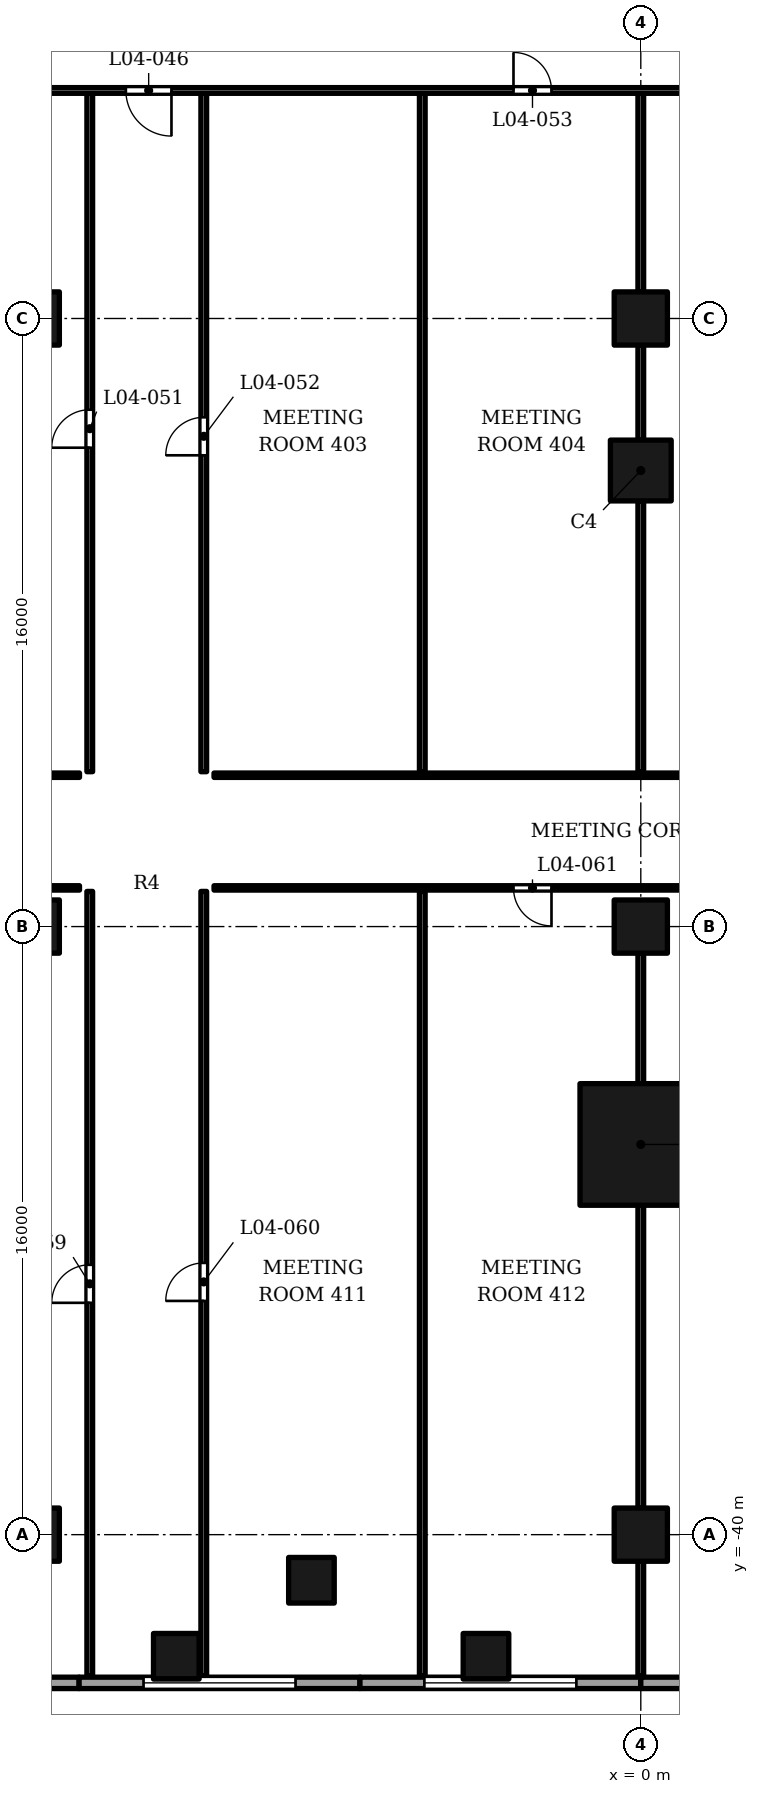
"""IFC4 building model, lengths in metres.
Left out: names, types, materials, properties, quantities, classifications, styles, units other than length and angle.
Written with IfcOpenShell. Run it as: python <this file> out.ifc"""

import sys

from ifc_helpers import new_model, si_unit, direction, frame, frame_2d, origin, origin_2d, place, context, subcontext, project, spatial, rectangle, extrude, element, fill, save


model = new_model("IFC4")
c1 = context("Model", 3, precision=1e-05, world=origin(), true_north=direction((0.0, 1.0)))
c2 = subcontext(c1, "Body", "Model", "MODEL_VIEW")
j1 = project(units=[si_unit("LENGTHUNIT", "METRE"), si_unit("PLANEANGLEUNIT", "RADIAN")], contexts=[c1])
p1 = place(None, origin())
s1 = spatial("IfcSite", under=j1, at=p1, CompositionType="ELEMENT")
p2 = place(p1, origin())
s2 = spatial("IfcBuilding", under=s1, at=p2, CompositionType="ELEMENT")
p3 = place(p2, frame((0.0, 0.0, 34.5)))
s3 = spatial("IfcBuildingStorey", under=s2, at=p3, CompositionType="ELEMENT", Elevation=34.5)
for number, where, z_axis, x_axis in (
    (1, (-16.0, -40.0, 0.0), (0.0, 0.0, 1.0), (1.0, 0.0, 0.0)),
    (2, (-16.0, -24.0, 0.0), (0.0, 0.0, 1.0), (1.0, 0.0, 0.0)),
    (3, (-16.0, -8.0, 0.0), (0.0, 0.0, 1.0), (1.0, 0.0, 0.0)),
    (4, (0.0, -40.0, 0.0), (0.0, 0.0, 1.0), (1.0, 0.0, 0.0)),
    (5, (0.0, -24.0, 0.0), (0.0, 0.0, 1.0), (1.0, 0.0, 0.0)),
    (6, (0.0, -8.0, 0.0), (0.0, 0.0, 1.0), (1.0, 0.0, 0.0)),
):
    element("IfcColumn", number, at=place(p3, frame(where, z_axis=z_axis, x_axis=x_axis)), inside=s3, PredefinedType="COLUMN", context=c2, shape_type="SweptSolid", body=[
        extrude(rectangle(XDim=1.4, YDim=1.4, at=origin_2d()), origin(), (0.0, 0.0, 1.0), 5.5),
    ])
for number, where, z_axis, x_axis in (
    (7, (-8.667, -41.2, 0.0), (0.0, 0.0, 1.0), (1.0, 0.0, 0.0)),
    (8, (-4.074, -43.2, 0.0), (0.0, 0.0, 1.0), (1.0, 0.0, 0.0)),
    (9, (-12.223, -43.2, 0.0), (0.0, 0.0, 1.0), (1.0, 0.0, 0.0)),
):
    element("IfcColumn", number, at=place(p3, frame(where, z_axis=z_axis, x_axis=x_axis)), inside=s3, PredefinedType="COLUMN", context=c2, shape_type="SweptSolid", body=[
        extrude(rectangle(XDim=1.2, YDim=1.2, at=origin_2d()), origin(), (0.0, 0.0, 1.0), 5.5),
    ])
p4 = place(p3, frame((0.0, -29.733, 0.0), z_axis=(0.0, 0.0, 1.0), x_axis=(0.0, 1.0, 0.0)))
e10 = element("IfcColumn", 10, at=p4, inside=s3, PredefinedType="COLUMN", context=c2, shape_type="SweptSolid", body=[
    extrude(rectangle(XDim=3.2, YDim=3.2, at=origin_2d()), origin(), (0.0, 0.0, 1.0), 5.5),
])
p5 = place(p3, frame((0.0, -12.0, 0.0), z_axis=(0.0, 0.0, 1.0), x_axis=(1.0, 0.0, 0.0)))
e11 = element("IfcColumn", 11, at=p5, inside=s3, PredefinedType="COLUMN", context=c2, shape_type="SweptSolid", body=[
    extrude(rectangle(XDim=1.6, YDim=1.6, at=origin_2d()), origin(), (0.0, 0.0, 1.0), 5.5),
])
p6 = place(p3, frame((-22.17, -43.9, 0.0), z_axis=(0.0, 0.0, 1.0), x_axis=(1.0, 0.0, 0.0)))
e12 = element("IfcWall", 12, at=p6, inside=s3, PredefinedType="SOLIDWALL", context=c2, shape_type="SweptSolid", body=[
    extrude(rectangle(XDim=7.39, YDim=0.3, at=frame_2d((3.695, 0.0))), origin(), (0.0, 0.0, 1.0), 4.1),
])
p7 = place(p6, frame((1.695, 0.0, 1.0)))
e13 = element("IfcOpeningElement", 13, at=p7, cuts=e12, PredefinedType="OPENING", context=c2, shape_type="SweptSolid", body=[
    extrude(rectangle(XDim=4.0, YDim=1.8, at=frame_2d((2.0, 0.9))), frame((0.0, 0.16, 0.0), z_axis=(0.0, -1.0, 0.0), x_axis=(1.0, 0.0, 0.0)), (0.0, 0.0, 1.0), 0.32),
])
p8 = place(p3, frame((-14.78, -43.9, 0.0), z_axis=(0.0, 0.0, 1.0), x_axis=(1.0, 0.0, 0.0)))
e14 = element("IfcWall", 14, at=p8, inside=s3, PredefinedType="SOLIDWALL", context=c2, shape_type="SweptSolid", body=[
    extrude(rectangle(XDim=7.39, YDim=0.3, at=frame_2d((3.695, 0.0))), origin(), (0.0, 0.0, 1.0), 4.1),
])
p9 = place(p8, frame((1.695, 0.0, 1.0)))
e15 = element("IfcOpeningElement", 15, at=p9, cuts=e14, PredefinedType="OPENING", context=c2, shape_type="SweptSolid", body=[
    extrude(rectangle(XDim=4.0, YDim=1.8, at=frame_2d((2.0, 0.9))), frame((0.0, 0.16, 0.0), z_axis=(0.0, -1.0, 0.0), x_axis=(1.0, 0.0, 0.0)), (0.0, 0.0, 1.0), 0.32),
])
p10 = place(p3, frame((-7.39, -43.9, 0.0), z_axis=(0.0, 0.0, 1.0), x_axis=(1.0, 0.0, 0.0)))
e16 = element("IfcWall", 16, at=p10, inside=s3, PredefinedType="SOLIDWALL", context=c2, shape_type="SweptSolid", body=[
    extrude(rectangle(XDim=7.39, YDim=0.3, at=frame_2d((3.695, 0.0))), origin(), (0.0, 0.0, 1.0), 4.1),
])
p11 = place(p10, frame((1.695, 0.0, 1.0)))
e17 = element("IfcOpeningElement", 17, at=p11, cuts=e16, PredefinedType="OPENING", context=c2, shape_type="SweptSolid", body=[
    extrude(rectangle(XDim=4.0, YDim=1.8, at=frame_2d((2.0, 0.9))), frame((0.0, 0.16, 0.0), z_axis=(0.0, -1.0, 0.0), x_axis=(1.0, 0.0, 0.0)), (0.0, 0.0, 1.0), 0.32),
])
p12 = place(p3, frame((0.0, -43.9, 0.0), z_axis=(0.0, 0.0, 1.0), x_axis=(1.0, 0.0, 0.0)))
e18 = element("IfcWall", 18, at=p12, inside=s3, PredefinedType="SOLIDWALL", context=c2, shape_type="SweptSolid", body=[
    extrude(rectangle(XDim=7.39, YDim=0.3, at=frame_2d((3.695, 0.0))), origin(), (0.0, 0.0, 1.0), 4.1),
])
p13 = place(p12, frame((1.695, 0.0, 1.0)))
e19 = element("IfcOpeningElement", 19, at=p13, cuts=e18, PredefinedType="OPENING", context=c2, shape_type="SweptSolid", body=[
    extrude(rectangle(XDim=4.0, YDim=1.8, at=frame_2d((2.0, 0.9))), frame((0.0, 0.16, 0.0), z_axis=(0.0, -1.0, 0.0), x_axis=(1.0, 0.0, 0.0)), (0.0, 0.0, 1.0), 0.32),
])
p14 = place(p3, frame((-22.2, -43.85, 5.5), z_axis=(0.0, 0.0, 1.0), x_axis=(1.0, 0.0, 0.0)))
e20 = element("IfcWall", 20, at=p14, inside=s3, PredefinedType="PARAPET", context=c2, shape_type="SweptSolid", body=[
    extrude(rectangle(XDim=14.8, YDim=0.3, at=frame_2d((7.4, 0.0))), origin(), (0.0, 0.0, 1.0), 1.1),
])
p15 = place(p3, frame((-7.4, -43.85, 5.5), z_axis=(0.0, 0.0, 1.0), x_axis=(1.0, 0.0, 0.0)))
e21 = element("IfcWall", 21, at=p15, inside=s3, PredefinedType="PARAPET", context=c2, shape_type="SweptSolid", body=[
    extrude(rectangle(XDim=14.8, YDim=0.3, at=frame_2d((7.4, 0.0))), origin(), (0.0, 0.0, 1.0), 1.1),
])
p16 = place(p3, frame((-14.5, -43.72, 0.0), z_axis=(0.0, 0.0, 1.0), x_axis=(0.0, 1.0, 0.0)))
e22 = element("IfcWall", 22, at=p16, inside=s3, PredefinedType="PARTITIONING", context=c2, shape_type="SweptSolid", body=[
    extrude(rectangle(XDim=20.645, YDim=0.15, at=frame_2d((10.323, 0.0))), origin(), (0.0, 0.0, 1.0), 3.85),
])
p17 = place(p16, frame((9.82, 0.0, 0.0)))
e23 = element("IfcOpeningElement", 23, at=p17, cuts=e22, PredefinedType="OPENING", context=c2, shape_type="SweptSolid", body=[
    extrude(rectangle(XDim=1.0, YDim=2.1, at=frame_2d((0.5, 1.05))), frame((0.0, 0.085, 0.0), z_axis=(0.0, -1.0, 0.0), x_axis=(1.0, 0.0, 0.0)), (0.0, 0.0, 1.0), 0.17),
])
p18 = place(p3, frame((-11.5, -43.72, 0.0), z_axis=(0.0, 0.0, 1.0), x_axis=(0.0, 1.0, 0.0)))
e24 = element("IfcWall", 24, at=p18, inside=s3, PredefinedType="PARTITIONING", context=c2, shape_type="SweptSolid", body=[
    extrude(rectangle(XDim=20.645, YDim=0.15, at=frame_2d((10.323, 0.0))), origin(), (0.0, 0.0, 1.0), 3.85),
])
p19 = place(p18, frame((9.87, 0.0, 0.0)))
e25 = element("IfcOpeningElement", 25, at=p19, cuts=e24, PredefinedType="OPENING", context=c2, shape_type="SweptSolid", body=[
    extrude(rectangle(XDim=1.0, YDim=2.1, at=frame_2d((0.5, 1.05))), frame((0.0, 0.085, 0.0), z_axis=(0.0, -1.0, 0.0), x_axis=(1.0, 0.0, 0.0)), (0.0, 0.0, 1.0), 0.17),
])
p20 = place(p3, frame((-5.75, -43.72, 0.0), z_axis=(0.0, 0.0, 1.0), x_axis=(0.0, 1.0, 0.0)))
e26 = element("IfcWall", 26, at=p20, inside=s3, PredefinedType="PARTITIONING", context=c2, shape_type="SweptSolid", body=[
    extrude(rectangle(XDim=20.645, YDim=0.15, at=frame_2d((10.323, 0.0))), origin(), (0.0, 0.0, 1.0), 3.85),
])
p21 = place(p3, frame((0.0, -43.72, 0.0), z_axis=(0.0, 0.0, 1.0), x_axis=(0.0, 1.0, 0.0)))
e27 = element("IfcWall", 27, at=p21, inside=s3, PredefinedType="PARTITIONING", context=c2, shape_type="SweptSolid", body=[
    extrude(rectangle(XDim=3.02, YDim=0.15, at=frame_2d((1.51, 0.0))), origin(), (0.0, 0.0, 1.0), 4.15),
])
p22 = place(p3, frame((0.0, -39.3, 0.0), z_axis=(0.0, 0.0, 1.0), x_axis=(0.0, 1.0, 0.0)))
e28 = element("IfcWall", 28, at=p22, inside=s3, PredefinedType="PARTITIONING", context=c2, shape_type="SweptSolid", body=[
    extrude(rectangle(XDim=7.967, YDim=0.15, at=frame_2d((3.983, 0.0))), origin(), (0.0, 0.0, 1.0), 3.85),
])
p23 = place(p3, frame((0.0, -28.133, 0.0), z_axis=(0.0, 0.0, 1.0), x_axis=(0.0, 1.0, 0.0)))
e29 = element("IfcWall", 29, at=p23, inside=s3, PredefinedType="PARTITIONING", context=c2, shape_type="SweptSolid", body=[
    extrude(rectangle(XDim=3.433, YDim=0.15, at=frame_2d((1.717, 0.0))), origin(), (0.0, 0.0, 1.0), 3.85),
])
p24 = place(p3, frame((-33.46, -22.982, 0.0), z_axis=(0.0, 0.0, 1.0), x_axis=(1.0, 0.0, 0.0)))
e30 = element("IfcWall", 30, at=p24, inside=s3, PredefinedType="PARTITIONING", context=c2, shape_type="SweptSolid", body=[
    extrude(rectangle(XDim=18.69, YDim=0.115, at=frame_2d((9.345, 0.0))), origin(), (0.0, 0.0, 1.0), 3.85),
])
p25 = place(p24, frame((4.06, 0.0, 0.0)))
e31 = element("IfcOpeningElement", 31, at=p25, cuts=e30, PredefinedType="OPENING", context=c2, shape_type="SweptSolid", body=[
    extrude(rectangle(XDim=1.0, YDim=2.1, at=frame_2d((0.5, 1.05))), frame((0.0, 0.067, 0.0), z_axis=(0.0, -1.0, 0.0), x_axis=(1.0, 0.0, 0.0)), (0.0, 0.0, 1.0), 0.135),
])
p26 = place(p3, frame((-11.23, -22.982, 0.0), z_axis=(0.0, 0.0, 1.0), x_axis=(1.0, 0.0, 0.0)))
e32 = element("IfcWall", 32, at=p26, inside=s3, PredefinedType="PARTITIONING", context=c2, shape_type="SweptSolid", body=[
    extrude(rectangle(XDim=22.46, YDim=0.115, at=frame_2d((11.23, 0.0))), origin(), (0.0, 0.0, 1.0), 3.85),
])
p27 = place(p26, frame((7.88, 0.0, 0.0)))
e33 = element("IfcOpeningElement", 33, at=p27, cuts=e32, PredefinedType="OPENING", context=c2, shape_type="SweptSolid", body=[
    extrude(rectangle(XDim=1.0, YDim=2.1, at=frame_2d((0.5, 1.05))), frame((0.0, 0.067, 0.0), z_axis=(0.0, -1.0, 0.0), x_axis=(1.0, 0.0, 0.0)), (0.0, 0.0, 1.0), 0.135),
])
p28 = place(p26, frame((13.63, 0.0, 0.0)))
e34 = element("IfcOpeningElement", 34, at=p28, cuts=e32, PredefinedType="OPENING", context=c2, shape_type="SweptSolid", body=[
    extrude(rectangle(XDim=1.0, YDim=2.1, at=frame_2d((0.5, 1.05))), frame((0.0, 0.067, 0.0), z_axis=(0.0, -1.0, 0.0), x_axis=(1.0, 0.0, 0.0)), (0.0, 0.0, 1.0), 0.135),
])
p29 = place(p3, frame((-33.675, -20.018, 0.0), z_axis=(0.0, 0.0, 1.0), x_axis=(1.0, 0.0, 0.0)))
e35 = element("IfcWall", 35, at=p29, inside=s3, PredefinedType="PARTITIONING", context=c2, shape_type="SweptSolid", body=[
    extrude(rectangle(XDim=18.905, YDim=0.115, at=frame_2d((9.453, 0.0))), origin(), (0.0, 0.0, 1.0), 3.85),
])
p30 = place(p29, frame((4.425, 0.0, 0.0)))
e36 = element("IfcOpeningElement", 36, at=p30, cuts=e35, PredefinedType="OPENING", context=c2, shape_type="SweptSolid", body=[
    extrude(rectangle(XDim=1.0, YDim=2.1, at=frame_2d((0.5, 1.05))), frame((0.0, 0.067, 0.0), z_axis=(0.0, -1.0, 0.0), x_axis=(1.0, 0.0, 0.0)), (0.0, 0.0, 1.0), 0.135),
])
p31 = place(p3, frame((-11.23, -20.018, 0.0), z_axis=(0.0, 0.0, 1.0), x_axis=(1.0, 0.0, 0.0)))
e37 = element("IfcWall", 37, at=p31, inside=s3, PredefinedType="PARTITIONING", context=c2, shape_type="SweptSolid", body=[
    extrude(rectangle(XDim=22.46, YDim=0.115, at=frame_2d((11.23, 0.0))), origin(), (0.0, 0.0, 1.0), 3.85),
])
p32 = place(p3, frame((-14.5, -19.925, 0.0), z_axis=(0.0, 0.0, 1.0), x_axis=(0.0, 1.0, 0.0)))
e38 = element("IfcWall", 38, at=p32, inside=s3, PredefinedType="PARTITIONING", context=c2, shape_type="SweptSolid", body=[
    extrude(rectangle(XDim=17.85, YDim=0.15, at=frame_2d((8.925, 0.0))), origin(), (0.0, 0.0, 1.0), 3.85),
])
p33 = place(p32, frame((8.525, 0.0, 0.0)))
e39 = element("IfcOpeningElement", 39, at=p33, cuts=e38, PredefinedType="OPENING", context=c2, shape_type="SweptSolid", body=[
    extrude(rectangle(XDim=1.0, YDim=2.1, at=frame_2d((0.5, 1.05))), frame((0.0, 0.085, 0.0), z_axis=(0.0, -1.0, 0.0), x_axis=(1.0, 0.0, 0.0)), (0.0, 0.0, 1.0), 0.17),
])
p34 = place(p3, frame((-11.5, -19.925, 0.0), z_axis=(0.0, 0.0, 1.0), x_axis=(0.0, 1.0, 0.0)))
e40 = element("IfcWall", 40, at=p34, inside=s3, PredefinedType="PARTITIONING", context=c2, shape_type="SweptSolid", body=[
    extrude(rectangle(XDim=17.85, YDim=0.15, at=frame_2d((8.925, 0.0))), origin(), (0.0, 0.0, 1.0), 3.85),
])
p35 = place(p34, frame((8.325, 0.0, 0.0)))
e41 = element("IfcOpeningElement", 41, at=p35, cuts=e40, PredefinedType="OPENING", context=c2, shape_type="SweptSolid", body=[
    extrude(rectangle(XDim=1.0, YDim=2.1, at=frame_2d((0.5, 1.05))), frame((0.0, 0.085, 0.0), z_axis=(0.0, -1.0, 0.0), x_axis=(1.0, 0.0, 0.0)), (0.0, 0.0, 1.0), 0.17),
])
p36 = place(p3, frame((-5.75, -19.925, 0.0), z_axis=(0.0, 0.0, 1.0), x_axis=(0.0, 1.0, 0.0)))
e42 = element("IfcWall", 42, at=p36, inside=s3, PredefinedType="PARTITIONING", context=c2, shape_type="SweptSolid", body=[
    extrude(rectangle(XDim=17.85, YDim=0.15, at=frame_2d((8.925, 0.0))), origin(), (0.0, 0.0, 1.0), 3.85),
])
p37 = place(p3, frame((0.0, -19.925, 0.0), z_axis=(0.0, 0.0, 1.0), x_axis=(0.0, 1.0, 0.0)))
e43 = element("IfcWall", 43, at=p37, inside=s3, PredefinedType="PARTITIONING", context=c2, shape_type="SweptSolid", body=[
    extrude(rectangle(XDim=7.125, YDim=0.15, at=frame_2d((3.562, 0.0))), origin(), (0.0, 0.0, 1.0), 3.85),
])
p38 = place(p3, frame((0.0, -11.2, 0.0), z_axis=(0.0, 0.0, 1.0), x_axis=(0.0, 1.0, 0.0)))
e44 = element("IfcWall", 44, at=p38, inside=s3, PredefinedType="PARTITIONING", context=c2, shape_type="SweptSolid", body=[
    extrude(rectangle(XDim=2.5, YDim=0.15, at=frame_2d((1.25, 0.0))), origin(), (0.0, 0.0, 1.0), 3.85),
])
p39 = place(p3, frame((0.0, -7.3, 0.0), z_axis=(0.0, 0.0, 1.0), x_axis=(0.0, 1.0, 0.0)))
e45 = element("IfcWall", 45, at=p39, inside=s3, PredefinedType="PARTITIONING", context=c2, shape_type="SweptSolid", body=[
    extrude(rectangle(XDim=5.225, YDim=0.15, at=frame_2d((2.613, 0.0))), origin(), (0.0, 0.0, 1.0), 5.05),
])
p40 = place(p3, frame((-33.46, -2.0, 0.0), z_axis=(0.0, 0.0, 1.0), x_axis=(1.0, 0.0, 0.0)))
e46 = element("IfcWall", 46, at=p40, inside=s3, PredefinedType="PARTITIONING", context=c2, shape_type="SweptSolid", body=[
    extrude(rectangle(XDim=66.92, YDim=0.15, at=frame_2d((33.46, 0.0))), origin(), (0.0, 0.0, 1.0), 3.85),
])
p41 = place(p40, frame((19.91, 0.0, 0.0)))
e47 = element("IfcOpeningElement", 47, at=p41, cuts=e46, PredefinedType="OPENING", context=c2, shape_type="SweptSolid", body=[
    extrude(rectangle(XDim=1.2, YDim=2.1, at=frame_2d((0.6, 1.05))), frame((0.0, 0.085, 0.0), z_axis=(0.0, -1.0, 0.0), x_axis=(1.0, 0.0, 0.0)), (0.0, 0.0, 1.0), 0.17),
])
p42 = place(p40, frame((45.91, 0.0, 0.0)))
e48 = element("IfcOpeningElement", 48, at=p42, cuts=e46, PredefinedType="OPENING", context=c2, shape_type="SweptSolid", body=[
    extrude(rectangle(XDim=1.2, YDim=2.1, at=frame_2d((0.6, 1.05))), frame((0.0, 0.085, 0.0), z_axis=(0.0, -1.0, 0.0), x_axis=(1.0, 0.0, 0.0)), (0.0, 0.0, 1.0), 0.17),
])
p43 = place(p40, frame((30.11, 0.0, 0.0)))
e49 = element("IfcOpeningElement", 49, at=p43, cuts=e46, PredefinedType="OPENING", context=c2, shape_type="SweptSolid", body=[
    extrude(rectangle(XDim=1.0, YDim=2.1, at=frame_2d((0.5, 1.05))), frame((0.0, 0.085, 0.0), z_axis=(0.0, -1.0, 0.0), x_axis=(1.0, 0.0, 0.0)), (0.0, 0.0, 1.0), 0.17),
])
p44 = place(p40, frame((35.86, 0.0, 0.0)))
e50 = element("IfcOpeningElement", 50, at=p44, cuts=e46, PredefinedType="OPENING", context=c2, shape_type="SweptSolid", body=[
    extrude(rectangle(XDim=1.0, YDim=2.1, at=frame_2d((0.5, 1.05))), frame((0.0, 0.085, 0.0), z_axis=(0.0, -1.0, 0.0), x_axis=(1.0, 0.0, 0.0)), (0.0, 0.0, 1.0), 0.17),
])
p45 = place(p9, origin())
e51 = element("IfcWindow", 51, at=p45, inside=s3, PartitioningType="SINGLE_PANEL", PredefinedType="WINDOW", context=c2, shape_type="SweptSolid", body=[
    extrude(rectangle(XDim=4.0, YDim=1.8, at=frame_2d((2.0, 0.9))), frame((0.0, 0.03, 0.0), z_axis=(0.0, -1.0, 0.0), x_axis=(1.0, 0.0, 0.0)), (0.0, 0.0, 1.0), 0.06),
])
fill(e15, e51)
p46 = place(p11, origin())
e52 = element("IfcWindow", 52, at=p46, inside=s3, PartitioningType="SINGLE_PANEL", PredefinedType="WINDOW", context=c2, shape_type="SweptSolid", body=[
    extrude(rectangle(XDim=4.0, YDim=1.8, at=frame_2d((2.0, 0.9))), frame((0.0, 0.03, 0.0), z_axis=(0.0, -1.0, 0.0), x_axis=(1.0, 0.0, 0.0)), (0.0, 0.0, 1.0), 0.06),
])
fill(e17, e52)
p47 = place(p41, origin())
e53 = element("IfcDoor", 53, at=p47, inside=s3, OperationType="SINGLE_SWING_RIGHT", PredefinedType="DOOR", context=c2, shape_type="SweptSolid", body=[
    extrude(rectangle(XDim=1.2, YDim=2.1, at=frame_2d((0.6, 1.05))), frame((0.0, 0.025, 0.0), z_axis=(0.0, -1.0, 0.0), x_axis=(1.0, 0.0, 0.0)), (0.0, 0.0, 1.0), 0.05),
])
fill(e47, e53)
p48 = place(p33, origin())
e54 = element("IfcDoor", 54, at=p48, inside=s3, OperationType="SINGLE_SWING_LEFT", PredefinedType="DOOR", context=c2, shape_type="SweptSolid", body=[
    extrude(rectangle(XDim=1.0, YDim=2.1, at=frame_2d((0.5, 1.05))), frame((0.0, 0.025, 0.0), z_axis=(0.0, -1.0, 0.0), x_axis=(1.0, 0.0, 0.0)), (0.0, 0.0, 1.0), 0.05),
])
fill(e39, e54)
p49 = place(p35, origin())
e55 = element("IfcDoor", 55, at=p49, inside=s3, OperationType="SINGLE_SWING_LEFT", PredefinedType="DOOR", context=c2, shape_type="SweptSolid", body=[
    extrude(rectangle(XDim=1.0, YDim=2.1, at=frame_2d((0.5, 1.05))), frame((0.0, 0.025, 0.0), z_axis=(0.0, -1.0, 0.0), x_axis=(1.0, 0.0, 0.0)), (0.0, 0.0, 1.0), 0.05),
])
fill(e41, e55)
p50 = place(p43, origin())
e56 = element("IfcDoor", 56, at=p50, inside=s3, OperationType="SINGLE_SWING_LEFT", PredefinedType="DOOR", context=c2, shape_type="SweptSolid", body=[
    extrude(rectangle(XDim=1.0, YDim=2.1, at=frame_2d((0.5, 1.05))), frame((0.0, 0.025, 0.0), z_axis=(0.0, -1.0, 0.0), x_axis=(1.0, 0.0, 0.0)), (0.0, 0.0, 1.0), 0.05),
])
fill(e49, e56)
p51 = place(p17, origin())
e57 = element("IfcDoor", 57, at=p51, inside=s3, OperationType="SINGLE_SWING_LEFT", PredefinedType="DOOR", context=c2, shape_type="SweptSolid", body=[
    extrude(rectangle(XDim=1.0, YDim=2.1, at=frame_2d((0.5, 1.05))), frame((0.0, 0.025, 0.0), z_axis=(0.0, -1.0, 0.0), x_axis=(1.0, 0.0, 0.0)), (0.0, 0.0, 1.0), 0.05),
])
fill(e23, e57)
p52 = place(p19, origin())
e58 = element("IfcDoor", 58, at=p52, inside=s3, OperationType="SINGLE_SWING_LEFT", PredefinedType="DOOR", context=c2, shape_type="SweptSolid", body=[
    extrude(rectangle(XDim=1.0, YDim=2.1, at=frame_2d((0.5, 1.05))), frame((0.0, 0.025, 0.0), z_axis=(0.0, -1.0, 0.0), x_axis=(1.0, 0.0, 0.0)), (0.0, 0.0, 1.0), 0.05),
])
fill(e25, e58)
p53 = place(p27, origin())
e59 = element("IfcDoor", 59, at=p53, inside=s3, OperationType="SINGLE_SWING_RIGHT", PredefinedType="DOOR", context=c2, shape_type="SweptSolid", body=[
    extrude(rectangle(XDim=1.0, YDim=2.1, at=frame_2d((0.5, 1.05))), frame((0.0, 0.025, 0.0), z_axis=(0.0, -1.0, 0.0), x_axis=(1.0, 0.0, 0.0)), (0.0, 0.0, 1.0), 0.05),
])
fill(e33, e59)
save(model, sys.argv[1])
